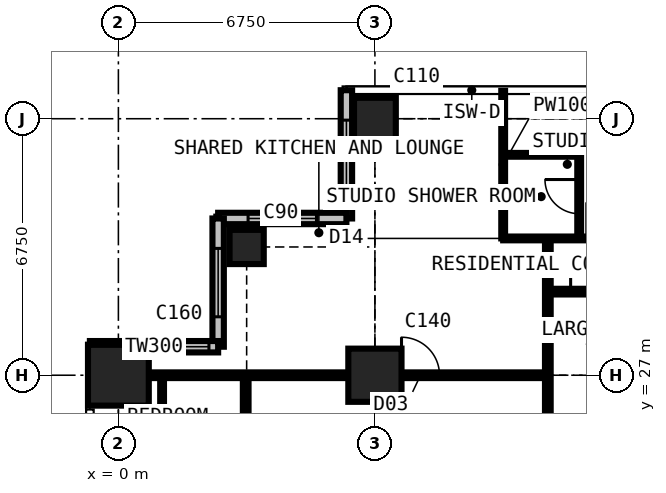
"""IFC4 building model, lengths in metres.
Left out: names, types, materials, properties, quantities, classifications, styles, units other than length and angle.
Written with IfcOpenShell. Run it as: python <this file> out.ifc"""

import sys

from ifc_helpers import new_model, si_unit, direction, frame, frame_2d, origin, origin_2d, place, context, subcontext, project, spatial, rectangle, extrude, element, fill, save


model = new_model("IFC4")
c1 = context("Model", 3, precision=1e-05, world=origin(), true_north=direction((0.0, 1.0)))
c2 = subcontext(c1, "Body", "Model", "MODEL_VIEW")
j1 = project(units=[si_unit("LENGTHUNIT", "METRE"), si_unit("PLANEANGLEUNIT", "RADIAN")], contexts=[c1])
p1 = place(None, origin())
s1 = spatial("IfcSite", under=j1, at=p1, CompositionType="ELEMENT")
p2 = place(p1, origin())
s2 = spatial("IfcBuilding", under=s1, at=p2, CompositionType="ELEMENT")
p3 = place(p2, frame((0.0, 0.0, 207.9)))
s3 = spatial("IfcBuildingStorey", under=s2, at=p3, CompositionType="ELEMENT", Elevation=207.9)
p4 = place(p3, frame((0.0, 27.0, 0.0), z_axis=(0.0, 0.0, 1.0), x_axis=(1.0, 0.0, 0.0)))
e1 = element("IfcColumn", 1, at=p4, inside=s3, PredefinedType="COLUMN", context=c2, shape_type="SweptSolid", body=[
    extrude(rectangle(XDim=1.6, YDim=1.6, at=origin_2d()), origin(), (0.0, 0.0, 1.0), 3.6),
])
p5 = place(p3, frame((3.375, 30.375, 0.0), z_axis=(0.0, 0.0, 1.0), x_axis=(1.0, 0.0, 0.0)))
e2 = element("IfcColumn", 2, at=p5, inside=s3, PredefinedType="COLUMN", context=c2, shape_type="SweptSolid", body=[
    extrude(rectangle(XDim=0.9, YDim=0.9, at=origin_2d()), origin(), (0.0, 0.0, 1.0), 3.6),
])
p6 = place(p3, frame((6.75, 27.0, 0.0), z_axis=(0.0, 0.0, 1.0), x_axis=(1.0, 0.0, 0.0)))
e3 = element("IfcColumn", 3, at=p6, inside=s3, PredefinedType="COLUMN", context=c2, shape_type="SweptSolid", body=[
    extrude(rectangle(XDim=1.4, YDim=1.4, at=origin_2d()), origin(), (0.0, 0.0, 1.0), 3.6),
])
p7 = place(p3, frame((6.75, 33.75, 0.0), z_axis=(0.0, 0.0, 1.0), x_axis=(1.0, 0.0, 0.0)))
e4 = element("IfcColumn", 4, at=p7, inside=s3, PredefinedType="COLUMN", context=c2, shape_type="SweptSolid", body=[
    extrude(rectangle(XDim=1.1, YDim=1.1, at=origin_2d()), origin(), (0.0, 0.0, 1.0), 3.6),
])
p8 = place(p3, frame((6.0, 34.5, 0.0), z_axis=(0.0, 0.0, 1.0), x_axis=(0.0, -1.0, 0.0)))
e5 = element("IfcWall", 5, at=p8, inside=s3, PredefinedType="SOLIDWALL", context=c2, shape_type="SweptSolid", body=[
    extrude(rectangle(XDim=3.375, YDim=0.3, at=frame_2d((1.688, 0.0))), origin(), (0.0, 0.0, 1.0), 3.375),
])
p9 = place(p8, frame((0.788, 0.0, 0.6)))
e6 = element("IfcOpeningElement", 6, at=p9, cuts=e5, PredefinedType="OPENING", context=c2, shape_type="SweptSolid", body=[
    extrude(rectangle(XDim=1.8, YDim=2.1, at=frame_2d((0.9, 1.05))), frame((0.0, 0.16, 0.0), z_axis=(0.0, -1.0, 0.0), x_axis=(1.0, 0.0, 0.0)), (0.0, 0.0, 1.0), 0.32),
])
p10 = place(p3, frame((6.0, 31.125, 0.0), z_axis=(0.0, 0.0, 1.0), x_axis=(-1.0, 0.0, 0.0)))
e7 = element("IfcWall", 7, at=p10, inside=s3, PredefinedType="SOLIDWALL", context=c2, shape_type="SweptSolid", body=[
    extrude(rectangle(XDim=3.375, YDim=0.3, at=frame_2d((1.688, 0.0))), origin(), (0.0, 0.0, 1.0), 3.375),
])
p11 = place(p10, frame((0.788, 0.0, 0.6)))
e8 = element("IfcOpeningElement", 8, at=p11, cuts=e7, PredefinedType="OPENING", context=c2, shape_type="SweptSolid", body=[
    extrude(rectangle(XDim=1.8, YDim=2.1, at=frame_2d((0.9, 1.05))), frame((0.0, 0.16, 0.0), z_axis=(0.0, -1.0, 0.0), x_axis=(1.0, 0.0, 0.0)), (0.0, 0.0, 1.0), 0.32),
])
p12 = place(p3, frame((2.625, 31.125, 0.0), z_axis=(0.0, 0.0, 1.0), x_axis=(0.0, -1.0, 0.0)))
e9 = element("IfcWall", 9, at=p12, inside=s3, PredefinedType="SOLIDWALL", context=c2, shape_type="SweptSolid", body=[
    extrude(rectangle(XDim=3.375, YDim=0.3, at=frame_2d((1.688, 0.0))), origin(), (0.0, 0.0, 1.0), 3.375),
])
p13 = place(p12, frame((0.788, 0.0, 0.6)))
e10 = element("IfcOpeningElement", 10, at=p13, cuts=e9, PredefinedType="OPENING", context=c2, shape_type="SweptSolid", body=[
    extrude(rectangle(XDim=1.8, YDim=2.1, at=frame_2d((0.9, 1.05))), frame((0.0, 0.16, 0.0), z_axis=(0.0, -1.0, 0.0), x_axis=(1.0, 0.0, 0.0)), (0.0, 0.0, 1.0), 0.32),
])
p14 = place(p3, frame((2.625, 27.75, 0.0), z_axis=(0.0, 0.0, 1.0), x_axis=(-1.0, 0.0, 0.0)))
e11 = element("IfcWall", 11, at=p14, inside=s3, PredefinedType="SOLIDWALL", context=c2, shape_type="SweptSolid", body=[
    extrude(rectangle(XDim=3.375, YDim=0.3, at=frame_2d((1.688, 0.0))), origin(), (0.0, 0.0, 1.0), 3.375),
])
p15 = place(p14, frame((0.242, 0.0, 0.9)))
e12 = element("IfcOpeningElement", 12, at=p15, cuts=e11, PredefinedType="OPENING", context=c2, shape_type="SweptSolid", body=[
    extrude(rectangle(XDim=1.5, YDim=1.8, at=frame_2d((0.75, 0.9))), frame((0.0, 0.16, 0.0), z_axis=(0.0, -1.0, 0.0), x_axis=(1.0, 0.0, 0.0)), (0.0, 0.0, 1.0), 0.32),
])
p16 = place(p3, frame((-0.734, 27.0, 0.0), z_axis=(0.0, 0.0, 1.0), x_axis=(1.0, 0.0, 0.0)))
e13 = element("IfcWall", 13, at=p16, inside=s3, PredefinedType="PARTITIONING", context=c2, shape_type="SweptSolid", body=[
    extrude(rectangle(XDim=12.034, YDim=0.15, at=frame_2d((6.017, 0.0))), origin(), (0.0, 0.0, 1.0), 2.877),
])
p17 = place(p16, frame((8.184, 0.0, 0.0)))
e14 = element("IfcOpeningElement", 14, at=p17, cuts=e13, PredefinedType="OPENING", context=c2, shape_type="SweptSolid", body=[
    extrude(rectangle(XDim=1.0, YDim=2.2, at=frame_2d((0.5, 1.1))), frame((0.0, 0.085, 0.0), z_axis=(0.0, -1.0, 0.0), x_axis=(1.0, 0.0, 0.0)), (0.0, 0.0, 1.0), 0.17),
])
p18 = place(p3, frame((1.15, 25.0, 0.0), z_axis=(0.0, 0.0, 1.0), x_axis=(0.0, 1.0, 0.0)))
e15 = element("IfcWall", 15, at=p18, inside=s3, PredefinedType="PARTITIONING", context=c2, shape_type="SweptSolid", body=[
    extrude(rectangle(XDim=2.0, YDim=0.1, at=frame_2d((1.0, 0.0))), origin(), (0.0, 0.0, 1.0), 3.375),
])
p19 = place(p3, frame((3.35, 13.5, 0.0), z_axis=(0.0, 0.0, 1.0), x_axis=(0.0, 1.0, 0.0)))
e16 = element("IfcWall", 16, at=p19, inside=s3, PredefinedType="PARTITIONING", context=c2, shape_type="SweptSolid", body=[
    extrude(rectangle(XDim=13.5, YDim=0.15, at=frame_2d((6.75, 0.0))), origin(), (0.0, 0.0, 1.0), 3.375),
])
p20 = place(p19, frame((10.325, 0.0, 0.0)))
e17 = element("IfcOpeningElement", 17, at=p20, cuts=e16, PredefinedType="OPENING", context=c2, shape_type="SweptSolid", body=[
    extrude(rectangle(XDim=0.95, YDim=2.2, at=frame_2d((0.475, 1.1))), frame((0.0, 0.085, 0.0), z_axis=(0.0, -1.0, 0.0), x_axis=(1.0, 0.0, 0.0)), (0.0, 0.0, 1.0), 0.17),
])
p21 = place(p19, frame((4.2, 0.0, 0.0)))
e18 = element("IfcOpeningElement", 18, at=p21, cuts=e16, PredefinedType="OPENING", context=c2, shape_type="SweptSolid", body=[
    extrude(rectangle(XDim=0.95, YDim=2.2, at=frame_2d((0.475, 1.1))), frame((0.0, 0.085, 0.0), z_axis=(0.0, -1.0, 0.0), x_axis=(1.0, 0.0, 0.0)), (0.0, 0.0, 1.0), 0.17),
])
p22 = place(p19, frame((7.0, 0.0, 0.0)))
e19 = element("IfcOpeningElement", 19, at=p22, cuts=e16, PredefinedType="OPENING", context=c2, shape_type="SweptSolid", body=[
    extrude(rectangle(XDim=0.95, YDim=2.2, at=frame_2d((0.475, 1.1))), frame((0.0, 0.085, 0.0), z_axis=(0.0, -1.0, 0.0), x_axis=(1.0, 0.0, 0.0)), (0.0, 0.0, 1.0), 0.17),
])
p23 = place(p3, frame((10.125, 30.6, 0.0), z_axis=(0.0, 0.0, 1.0), x_axis=(0.0, 1.0, 0.0)))
e20 = element("IfcWall", 20, at=p23, inside=s3, PredefinedType="PARTITIONING", context=c2, shape_type="SweptSolid", body=[
    extrude(rectangle(XDim=3.884, YDim=0.1, at=frame_2d((1.942, 0.0))), origin(), (0.0, 0.0, 1.0), 3.375),
])
p24 = place(p3, frame((10.125, 30.6, 0.0), z_axis=(0.0, 0.0, 1.0), x_axis=(1.0, 0.0, 0.0)))
e21 = element("IfcWall", 21, at=p24, inside=s3, PredefinedType="PARTITIONING", context=c2, shape_type="SweptSolid", body=[
    extrude(rectangle(XDim=3.375, YDim=0.1, at=frame_2d((1.688, 0.0))), origin(), (0.0, 0.0, 1.0), 3.375),
])
p25 = place(p24, frame((2.2, 0.0, 0.0)))
e22 = element("IfcOpeningElement", 22, at=p25, cuts=e21, PredefinedType="OPENING", context=c2, shape_type="SweptSolid", body=[
    extrude(rectangle(XDim=0.95, YDim=2.2, at=frame_2d((0.475, 1.1))), frame((0.0, 0.06, 0.0), z_axis=(0.0, -1.0, 0.0), x_axis=(1.0, 0.0, 0.0)), (0.0, 0.0, 1.0), 0.12),
])
p26 = place(p3, frame((10.125, 32.8, 0.0), z_axis=(0.0, 0.0, 1.0), x_axis=(1.0, 0.0, 0.0)))
e23 = element("IfcWall", 23, at=p26, inside=s3, PredefinedType="PARTITIONING", context=c2, shape_type="SweptSolid", body=[
    extrude(rectangle(XDim=2.0, YDim=0.1, at=frame_2d((1.0, 0.0))), origin(), (0.0, 0.0, 1.0), 3.375),
])
p27 = place(p3, frame((11.3, 11.3, 0.0), z_axis=(0.0, 0.0, 1.0), x_axis=(0.0, 1.0, 0.0)))
e24 = element("IfcWall", 24, at=p27, inside=s3, PredefinedType="PARTITIONING", context=c2, shape_type="SweptSolid", body=[
    extrude(rectangle(XDim=19.3, YDim=0.15, at=frame_2d((9.65, 0.0))), origin(), (0.0, 0.0, 1.0), 3.375),
])
p28 = place(p27, frame((13.525, 0.0, 0.0)))
e25 = element("IfcOpeningElement", 25, at=p28, cuts=e24, PredefinedType="OPENING", context=c2, shape_type="SweptSolid", body=[
    extrude(rectangle(XDim=1.0, YDim=2.2, at=frame_2d((0.5, 1.1))), frame((0.0, 0.085, 0.0), z_axis=(0.0, -1.0, 0.0), x_axis=(1.0, 0.0, 0.0)), (0.0, 0.0, 1.0), 0.17),
])
p29 = place(p27, frame((10.438, 0.0, 0.0)))
e26 = element("IfcOpeningElement", 26, at=p29, cuts=e24, PredefinedType="OPENING", context=c2, shape_type="SweptSolid", body=[
    extrude(rectangle(XDim=1.0, YDim=2.2, at=frame_2d((0.5, 1.1))), frame((0.0, 0.085, 0.0), z_axis=(0.0, -1.0, 0.0), x_axis=(1.0, 0.0, 0.0)), (0.0, 0.0, 1.0), 0.17),
])
p30 = place(p3, frame((11.3, 29.2, 0.0), z_axis=(0.0, 0.0, 1.0), x_axis=(1.0, 0.0, 0.0)))
e27 = element("IfcWall", 27, at=p30, inside=s3, PredefinedType="PARTITIONING", context=c2, shape_type="SweptSolid", body=[
    extrude(rectangle(XDim=19.809, YDim=0.15, at=frame_2d((9.904, 0.0))), origin(), (0.0, 0.0, 1.0), 3.375),
])
p31 = place(p30, frame((12.9, 0.0, 0.0)))
e28 = element("IfcOpeningElement", 28, at=p31, cuts=e27, PredefinedType="OPENING", context=c2, shape_type="SweptSolid", body=[
    extrude(rectangle(XDim=1.0, YDim=2.2, at=frame_2d((0.5, 1.1))), frame((0.0, 0.085, 0.0), z_axis=(0.0, -1.0, 0.0), x_axis=(1.0, 0.0, 0.0)), (0.0, 0.0, 1.0), 0.17),
])
p32 = place(p30, frame((6.4, 0.0, 0.0)))
e29 = element("IfcOpeningElement", 29, at=p32, cuts=e27, PredefinedType="OPENING", context=c2, shape_type="SweptSolid", body=[
    extrude(rectangle(XDim=0.95, YDim=2.2, at=frame_2d((0.475, 1.1))), frame((0.0, 0.085, 0.0), z_axis=(0.0, -1.0, 0.0), x_axis=(1.0, 0.0, 0.0)), (0.0, 0.0, 1.0), 0.17),
])
p33 = place(p30, frame((0.6, 0.0, 0.0)))
e30 = element("IfcOpeningElement", 30, at=p33, cuts=e27, PredefinedType="OPENING", context=c2, shape_type="SweptSolid", body=[
    extrude(rectangle(XDim=1.0, YDim=2.2, at=frame_2d((0.5, 1.1))), frame((0.0, 0.085, 0.0), z_axis=(0.0, -1.0, 0.0), x_axis=(1.0, 0.0, 0.0)), (0.0, 0.0, 1.0), 0.17),
])
p34 = place(p3, frame((12.125, 30.6, 0.0), z_axis=(0.0, 0.0, 1.0), x_axis=(0.0, 1.0, 0.0)))
e31 = element("IfcWall", 31, at=p34, inside=s3, PredefinedType="PARTITIONING", context=c2, shape_type="SweptSolid", body=[
    extrude(rectangle(XDim=2.2, YDim=0.1, at=frame_2d((1.1, 0.0))), origin(), (0.0, 0.0, 1.0), 3.375),
])
p35 = place(p34, frame((0.65, 0.0, 0.0)))
e32 = element("IfcOpeningElement", 32, at=p35, cuts=e31, PredefinedType="OPENING", context=c2, shape_type="SweptSolid", body=[
    extrude(rectangle(XDim=0.9, YDim=2.2, at=frame_2d((0.45, 1.1))), frame((0.0, 0.06, 0.0), z_axis=(0.0, -1.0, 0.0), x_axis=(1.0, 0.0, 0.0)), (0.0, 0.0, 1.0), 0.12),
])
p36 = place(p9, origin())
e33 = element("IfcWindow", 33, at=p36, inside=s3, PartitioningType="SINGLE_PANEL", PredefinedType="WINDOW", context=c2, shape_type="SweptSolid", body=[
    extrude(rectangle(XDim=1.8, YDim=2.1, at=frame_2d((0.9, 1.05))), frame((0.0, 0.03, 0.0), z_axis=(0.0, -1.0, 0.0), x_axis=(1.0, 0.0, 0.0)), (0.0, 0.0, 1.0), 0.06),
])
fill(e6, e33)
p37 = place(p11, origin())
e34 = element("IfcWindow", 34, at=p37, inside=s3, PartitioningType="SINGLE_PANEL", PredefinedType="WINDOW", context=c2, shape_type="SweptSolid", body=[
    extrude(rectangle(XDim=1.8, YDim=2.1, at=frame_2d((0.9, 1.05))), frame((0.0, 0.03, 0.0), z_axis=(0.0, -1.0, 0.0), x_axis=(1.0, 0.0, 0.0)), (0.0, 0.0, 1.0), 0.06),
])
fill(e8, e34)
p38 = place(p13, origin())
e35 = element("IfcWindow", 35, at=p38, inside=s3, PartitioningType="SINGLE_PANEL", PredefinedType="WINDOW", context=c2, shape_type="SweptSolid", body=[
    extrude(rectangle(XDim=1.8, YDim=2.1, at=frame_2d((0.9, 1.05))), frame((0.0, 0.03, 0.0), z_axis=(0.0, -1.0, 0.0), x_axis=(1.0, 0.0, 0.0)), (0.0, 0.0, 1.0), 0.06),
])
fill(e10, e35)
p39 = place(p15, origin())
e36 = element("IfcWindow", 36, at=p39, inside=s3, PartitioningType="SINGLE_PANEL", PredefinedType="WINDOW", context=c2, shape_type="SweptSolid", body=[
    extrude(rectangle(XDim=1.5, YDim=1.8, at=frame_2d((0.75, 0.9))), frame((0.0, 0.03, 0.0), z_axis=(0.0, -1.0, 0.0), x_axis=(1.0, 0.0, 0.0)), (0.0, 0.0, 1.0), 0.06),
])
fill(e12, e36)
p40 = place(p35, origin())
e37 = element("IfcDoor", 37, at=p40, inside=s3, OperationType="SINGLE_SWING_RIGHT", PredefinedType="DOOR", context=c2, shape_type="SweptSolid", body=[
    extrude(rectangle(XDim=0.9, YDim=2.2, at=frame_2d((0.45, 1.1))), frame((0.0, 0.025, 0.0), z_axis=(0.0, -1.0, 0.0), x_axis=(1.0, 0.0, 0.0)), (0.0, 0.0, 1.0), 0.05),
])
fill(e32, e37)
p41 = place(p33, origin())
e38 = element("IfcDoor", 38, at=p41, inside=s3, OperationType="SINGLE_SWING_LEFT", PredefinedType="DOOR", context=c2, shape_type="SweptSolid", body=[
    extrude(rectangle(XDim=1.0, YDim=2.2, at=frame_2d((0.5, 1.1))), frame((0.0, 0.025, 0.0), z_axis=(0.0, -1.0, 0.0), x_axis=(1.0, 0.0, 0.0)), (0.0, 0.0, 1.0), 0.05),
])
fill(e30, e38)
p42 = place(p17, origin())
e39 = element("IfcDoor", 39, at=p42, inside=s3, OperationType="SINGLE_SWING_LEFT", PredefinedType="DOOR", context=c2, shape_type="SweptSolid", body=[
    extrude(rectangle(XDim=1.0, YDim=2.2, at=frame_2d((0.5, 1.1))), frame((0.0, 0.025, 0.0), z_axis=(0.0, -1.0, 0.0), x_axis=(1.0, 0.0, 0.0)), (0.0, 0.0, 1.0), 0.05),
])
fill(e14, e39)
save(model, sys.argv[1])
